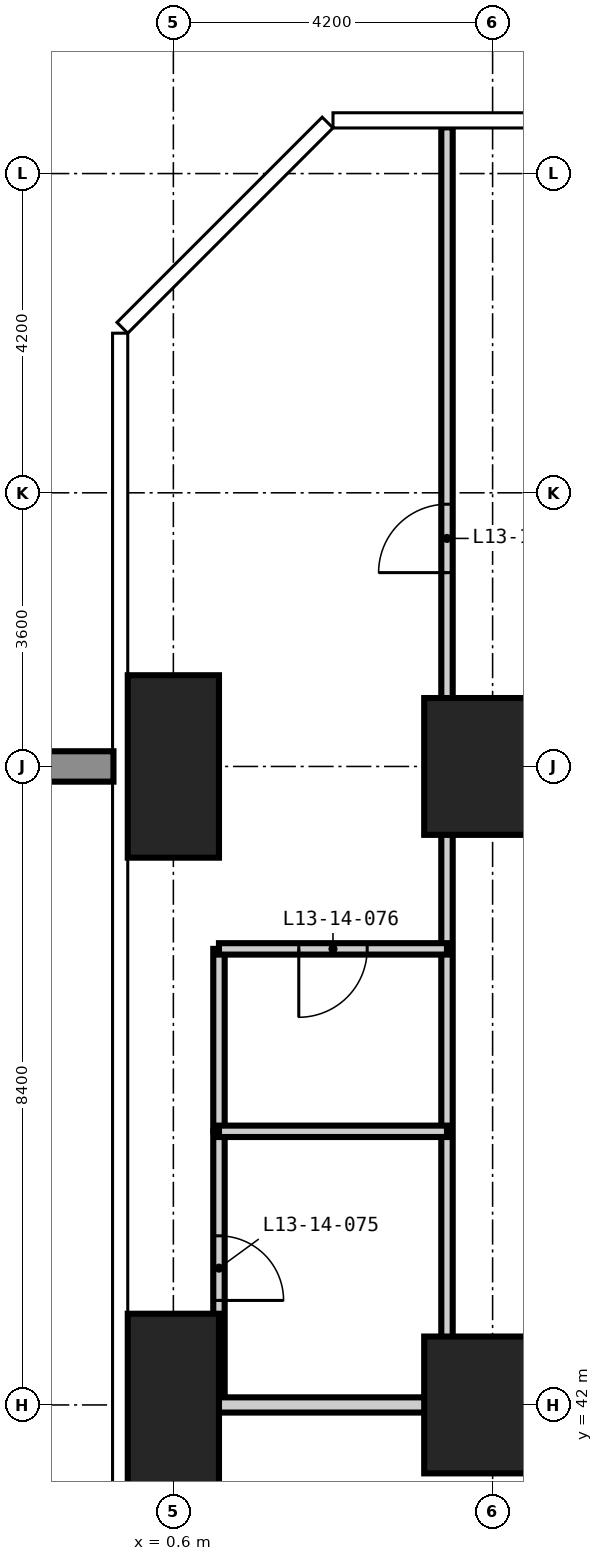
"""IFC4 building model, lengths in metres.
Left out: names, types, materials, properties, quantities, classifications, styles, units other than length and angle.
Written with IfcOpenShell. Run it as: python <this file> out.ifc"""

import sys

from ifc_helpers import new_model, si_unit, direction, frame, frame_2d, origin, origin_2d, place, context, subcontext, project, spatial, rectangle, extrude, element, fill, save


model = new_model("IFC4")
c1 = context("Model", 3, precision=1e-05, world=origin(), true_north=direction((0.0, 1.0)))
c2 = subcontext(c1, "Body", "Model", "MODEL_VIEW")
j1 = project(units=[si_unit("LENGTHUNIT", "METRE"), si_unit("PLANEANGLEUNIT", "RADIAN")], contexts=[c1])
p1 = place(None, origin())
s1 = spatial("IfcSite", under=j1, at=p1, CompositionType="ELEMENT")
p2 = place(p1, origin())
s2 = spatial("IfcBuilding", under=s1, at=p2, CompositionType="ELEMENT")
p3 = place(p2, frame((0.0, 0.0, 55.8)))
s3 = spatial("IfcBuildingStorey", under=s2, at=p3, CompositionType="ELEMENT", Elevation=55.8)
for number, where, z_axis, x_axis in (
    (1, (0.6, 42.0, -0.35), (0.0, 0.0, 1.0), (1.0, 0.0, 0.0)),
    (2, (0.6, 50.4, -0.35), (0.0, 0.0, 1.0), (1.0, 0.0, 0.0)),
):
    element("IfcColumn", number, at=place(p3, frame(where, z_axis=z_axis, x_axis=x_axis)), inside=s3, PredefinedType="COLUMN", context=c2, shape_type="SweptSolid", body=[
        extrude(rectangle(XDim=1.2, YDim=2.4, at=origin_2d()), origin(), (0.0, 0.0, 1.0), 3.6),
    ])
for number, where, z_axis, x_axis in (
    (3, (4.8, 42.0, -0.35), (0.0, 0.0, 1.0), (1.0, 0.0, 0.0)),
    (4, (4.8, 50.4, -0.35), (0.0, 0.0, 1.0), (1.0, 0.0, 0.0)),
):
    element("IfcColumn", number, at=place(p3, frame(where, z_axis=z_axis, x_axis=x_axis)), inside=s3, PredefinedType="COLUMN", context=c2, shape_type="SweptSolid", body=[
        extrude(rectangle(XDim=1.8, YDim=1.8, at=origin_2d()), origin(), (0.0, 0.0, 1.0), 3.6),
    ])
p4 = place(p3, frame((1.2, 42.0, 0.0), z_axis=(0.0, 0.0, 1.0), x_axis=(0.0, 1.0, 0.0)))
e5 = element("IfcWall", 5, at=p4, inside=s3, PredefinedType="PARTITIONING", context=c2, shape_type="SweptSolid", body=[
    extrude(rectangle(XDim=3.6, YDim=0.15, at=frame_2d((1.8, 0.0))), origin(), (0.0, 0.0, 1.0), 3.25),
])
p5 = place(p4, frame((1.375, 0.0, 0.0)))
e6 = element("IfcOpeningElement", 6, at=p5, cuts=e5, PredefinedType="OPENING", context=c2, shape_type="SweptSolid", body=[
    extrude(rectangle(XDim=0.85, YDim=2.1, at=frame_2d((0.425, 1.05))), frame((0.0, 0.085, 0.0), z_axis=(0.0, -1.0, 0.0), x_axis=(1.0, 0.0, 0.0)), (0.0, 0.0, 1.0), 0.17),
])
p6 = place(p3, frame((-0.008, 42.0, 0.0), z_axis=(0.0, 0.0, 1.0), x_axis=(1.0, 0.0, 0.0)))
e7 = element("IfcWall", 7, at=p6, inside=s3, PredefinedType="PARTITIONING", context=c2, shape_type="SweptSolid", body=[
    extrude(rectangle(XDim=13.858, YDim=0.2, at=frame_2d((6.929, 0.0))), origin(), (0.0, 0.0, 1.0), 3.25),
])
p7 = place(p3, frame((1.2, 45.6, 0.0), z_axis=(0.0, 0.0, 1.0), x_axis=(0.0, 1.0, 0.0)))
e8 = element("IfcWall", 8, at=p7, inside=s3, PredefinedType="PARTITIONING", context=c2, shape_type="SweptSolid", body=[
    extrude(rectangle(XDim=2.4, YDim=0.15, at=frame_2d((1.2, 0.0))), origin(), (0.0, 0.0, 1.0), 3.25),
])
p8 = place(p3, frame((4.2, 42.0, 0.0), z_axis=(0.0, 0.0, 1.0), x_axis=(0.0, 1.0, 0.0)))
e9 = element("IfcWall", 9, at=p8, inside=s3, PredefinedType="PARTITIONING", context=c2, shape_type="SweptSolid", body=[
    extrude(rectangle(XDim=16.808, YDim=0.15, at=frame_2d((8.404, 0.0))), origin(), (0.0, 0.0, 1.0), 3.25),
])
p9 = place(p8, frame((10.95, 0.0, 0.0)))
e10 = element("IfcOpeningElement", 10, at=p9, cuts=e9, PredefinedType="OPENING", context=c2, shape_type="SweptSolid", body=[
    extrude(rectangle(XDim=0.9, YDim=2.1, at=frame_2d((0.45, 1.05))), frame((0.0, 0.085, 0.0), z_axis=(0.0, -1.0, 0.0), x_axis=(1.0, 0.0, 0.0)), (0.0, 0.0, 1.0), 0.17),
])
p10 = place(p3, frame((1.2, 45.6, 0.0), z_axis=(0.0, 0.0, 1.0), x_axis=(1.0, 0.0, 0.0)))
e11 = element("IfcWall", 11, at=p10, inside=s3, PredefinedType="PARTITIONING", context=c2, shape_type="SweptSolid", body=[
    extrude(rectangle(XDim=3.0, YDim=0.15, at=frame_2d((1.5, 0.0))), origin(), (0.0, 0.0, 1.0), 3.25),
])
p11 = place(p3, frame((1.2, 48.0, 0.0), z_axis=(0.0, 0.0, 1.0), x_axis=(1.0, 0.0, 0.0)))
e12 = element("IfcWall", 12, at=p11, inside=s3, PredefinedType="PARTITIONING", context=c2, shape_type="SweptSolid", body=[
    extrude(rectangle(XDim=3.0, YDim=0.15, at=frame_2d((1.5, 0.0))), origin(), (0.0, 0.0, 1.0), 3.25),
])
p12 = place(p11, frame((1.05, 0.0, 0.0)))
e13 = element("IfcOpeningElement", 13, at=p12, cuts=e12, PredefinedType="OPENING", context=c2, shape_type="SweptSolid", body=[
    extrude(rectangle(XDim=0.9, YDim=2.1, at=frame_2d((0.45, 1.05))), frame((0.0, 0.085, 0.0), z_axis=(0.0, -1.0, 0.0), x_axis=(1.0, 0.0, 0.0)), (0.0, 0.0, 1.0), 0.17),
])
p13 = place(p9, origin())
e14 = element("IfcDoor", 14, at=p13, inside=s3, OperationType="SINGLE_SWING_LEFT", PredefinedType="DOOR", context=c2, shape_type="SweptSolid", body=[
    extrude(rectangle(XDim=0.9, YDim=2.1, at=frame_2d((0.45, 1.05))), frame((0.0, 0.025, 0.0), z_axis=(0.0, -1.0, 0.0), x_axis=(1.0, 0.0, 0.0)), (0.0, 0.0, 1.0), 0.05),
])
fill(e10, e14)
p14 = place(p5, frame((0.85, 0.0, 0.0), z_axis=(0.0, 0.0, 1.0), x_axis=(-1.0, 0.0, 0.0)))
e15 = element("IfcDoor", 15, at=p14, inside=s3, OperationType="SINGLE_SWING_RIGHT", PredefinedType="DOOR", context=c2, shape_type="SweptSolid", body=[
    extrude(rectangle(XDim=0.85, YDim=2.1, at=frame_2d((0.425, 1.05))), frame((0.0, 0.025, 0.0), z_axis=(0.0, -1.0, 0.0), x_axis=(1.0, 0.0, 0.0)), (0.0, 0.0, 1.0), 0.05),
])
fill(e6, e15)
p15 = place(p12, frame((0.9, 0.0, 0.0), z_axis=(0.0, 0.0, 1.0), x_axis=(-1.0, 0.0, 0.0)))
e16 = element("IfcDoor", 16, at=p15, inside=s3, OperationType="SINGLE_SWING_RIGHT", PredefinedType="DOOR", context=c2, shape_type="SweptSolid", body=[
    extrude(rectangle(XDim=0.9, YDim=2.1, at=frame_2d((0.45, 1.05))), frame((0.0, 0.025, 0.0), z_axis=(0.0, -1.0, 0.0), x_axis=(1.0, 0.0, 0.0)), (0.0, 0.0, 1.0), 0.05),
])
fill(e13, e16)
save(model, sys.argv[1])
